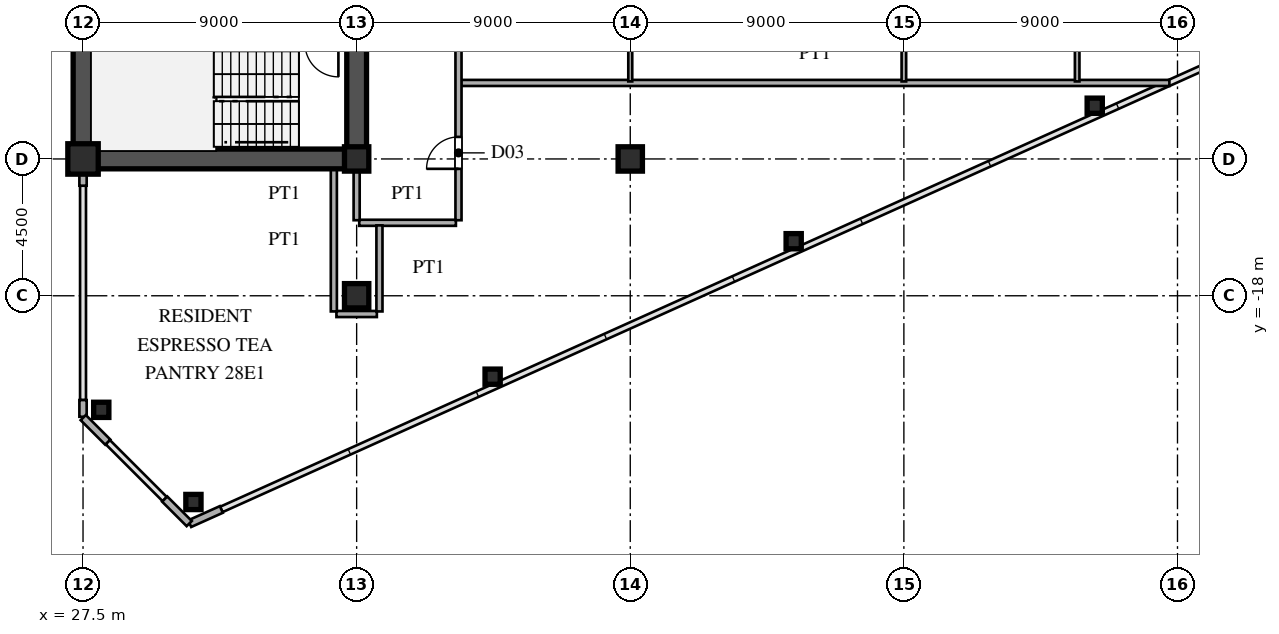
"""IFC4 building model, lengths in metres.
Left out: names, types, materials, properties, quantities, classifications, styles, units other than length and angle.
Written with IfcOpenShell. Run it as: python <this file> out.ifc"""

import sys

from ifc_helpers import new_model, si_unit, direction, frame, frame_2d, origin, origin_2d, place, context, subcontext, project, spatial, rectangle, hollow_rectangle, i_section, extrude, source, transform, mapped, element, fill, save


model = new_model("IFC4")
c1 = context("Model", 3, precision=1e-05, world=origin(), true_north=direction((0.0, 1.0)))
c2 = subcontext(c1, "Body", "Model", "MODEL_VIEW")
j1 = project(units=[si_unit("LENGTHUNIT", "METRE"), si_unit("PLANEANGLEUNIT", "RADIAN")], contexts=[c1])
p1 = place(None, origin())
s1 = spatial("IfcSite", under=j1, at=p1, CompositionType="ELEMENT")
p2 = place(p1, origin())
s2 = spatial("IfcBuilding", under=s1, at=p2, CompositionType="ELEMENT")
p3 = place(p2, frame((0.0, 0.0, 106.8)))
s3 = spatial("IfcBuildingStorey", under=s2, at=p3, CompositionType="ELEMENT", Elevation=106.8)
m1 = source(origin(), c2, "Body", "SweptSolid", [
    extrude(hollow_rectangle(XDim=1.0, YDim=1.0, WallThickness=0.042, at=origin_2d()), origin(), (0.0, 0.0, 1.0), 3.6),
])
p4 = place(p3, frame((27.5, -13.5, 0.0), z_axis=(0.0, 0.0, 1.0), x_axis=(1.0, 0.0, 0.0)))
e1 = element("IfcColumn", 1, at=p4, inside=s3, PredefinedType="COLUMN", context=c2, shape_type="MappedRepresentation", body=[
    mapped(m1, transform((0.0, 0.0, 0.0), scale=1.0)),
])
m2 = source(origin(), c2, "Body", "SweptSolid", [
    extrude(i_section(OverallWidth=0.8, OverallDepth=0.8, WebThickness=0.032, FlangeThickness=0.05, at=origin_2d()), origin(), (0.0, 0.0, 1.0), 3.6),
])
for number, where, z_axis, x_axis in (
    (2, (36.5, -18.0, 0.0), (0.0, 0.0, 1.0), (1.0, 0.0, 0.0)),
    (3, (36.5, -13.5, 0.0), (0.0, 0.0, 1.0), (1.0, 0.0, 0.0)),
    (4, (45.5, -13.5, 0.0), (0.0, 0.0, 1.0), (1.0, 0.0, 0.0)),
):
    element("IfcColumn", number, at=place(p3, frame(where, z_axis=z_axis, x_axis=x_axis)), inside=s3, PredefinedType="COLUMN", context=c2, shape_type="MappedRepresentation", body=[
        mapped(m2, transform((0.0, 0.0, 0.0), scale=1.0)),
    ])
m3 = source(origin(), c2, "Body", "SweptSolid", [
    extrude(hollow_rectangle(XDim=0.5, YDim=0.5, WallThickness=0.02, at=origin_2d()), origin(), (0.0, 0.0, 1.0), 3.6),
])
for number, where, z_axis, x_axis in (
    (5, (31.131, -24.783, 0.0), (0.0, 0.0, 1.0), (1.0, 0.0, 0.0)),
    (6, (28.1, -21.751, 0.0), (0.0, 0.0, 1.0), (1.0, 0.0, 0.0)),
    (7, (40.973, -20.661, 0.0), (0.0, 0.0, 1.0), (1.0, 0.0, 0.0)),
    (8, (50.875, -16.205, 0.0), (0.0, 0.0, 1.0), (1.0, 0.0, 0.0)),
    (9, (60.778, -11.749, 0.0), (0.0, 0.0, 1.0), (1.0, 0.0, 0.0)),
):
    element("IfcColumn", number, at=place(p3, frame(where, z_axis=z_axis, x_axis=x_axis)), inside=s3, PredefinedType="COLUMN", context=c2, shape_type="MappedRepresentation", body=[
        mapped(m3, transform((0.0, 0.0, 0.0), scale=1.0)),
    ])
p5 = place(p3, frame((31.009, -25.496, 0.0), z_axis=(0.0, 0.0, 1.0), x_axis=(0.911929519623, 0.410346866979, 0.0)))
e10 = element("IfcWall", 10, at=p5, inside=s3, PredefinedType="SOLIDWALL", context=c2, shape_type="SweptSolid", body=[
    extrude(rectangle(XDim=1.14, YDim=0.24, at=frame_2d((0.57, 0.0))), origin(), (0.0, 0.0, 1.0), 3.38),
])
p6 = place(p3, frame((27.5, -21.98, 0.0), z_axis=(0.0, 0.0, 1.0), x_axis=(0.0, 1.0, 0.0)))
e11 = element("IfcWall", 11, at=p6, inside=s3, PredefinedType="SOLIDWALL", context=c2, shape_type="SweptSolid", body=[
    extrude(rectangle(XDim=0.55, YDim=0.24, at=frame_2d((0.275, 0.0))), origin(), (0.0, 0.0, 1.0), 3.38),
])
p7 = place(p3, frame((27.5, -14.38, 0.0), z_axis=(0.0, 0.0, 1.0), x_axis=(0.0, 1.0, 0.0)))
e12 = element("IfcWall", 12, at=p7, inside=s3, PredefinedType="SOLIDWALL", context=c2, shape_type="SweptSolid", body=[
    extrude(rectangle(XDim=0.55, YDim=0.24, at=frame_2d((0.275, 0.0))), origin(), (0.0, 0.0, 1.0), 1.88),
])
for number, where, z_axis, x_axis in (
    (13, (27.507, -22.007, 0.0), (0.0, 0.0, 1.0), (0.707, -0.707, 0.0)),
    (14, (30.187, -24.687, 0.0), (0.0, 0.0, 1.0), (0.707, -0.707, 0.0)),
):
    element("IfcWall", number, at=place(p3, frame(where, z_axis=z_axis, x_axis=x_axis)), inside=s3, PredefinedType="SOLIDWALL", context=c2, shape_type="SweptSolid", body=[
        extrude(rectangle(XDim=1.14, YDim=0.24, at=frame_2d((0.57, 0.0))), origin(), (0.0, 0.0, 1.0), 3.38),
    ])
p8 = place(p3, frame((27.5, -13.5, 0.0), z_axis=(0.0, 0.0, 1.0), x_axis=(0.0, 1.0, 0.0)))
e15 = element("IfcWall", 15, at=p8, inside=s3, PredefinedType="SHEAR", context=c2, shape_type="SweptSolid", body=[
    extrude(rectangle(XDim=12.2, YDim=0.65, at=frame_2d((6.1, 0.0))), origin(), (0.0, 0.0, 1.0), 3.38),
])
p9 = place(p3, frame((27.5, -13.5, 0.0), z_axis=(0.0, 0.0, 1.0), x_axis=(1.0, 0.0, 0.0)))
e16 = element("IfcWall", 16, at=p9, inside=s3, PredefinedType="SHEAR", context=c2, shape_type="SweptSolid", body=[
    extrude(rectangle(XDim=9.0, YDim=0.65, at=frame_2d((4.5, 0.0))), origin(), (0.0, 0.0, 1.0), 3.38),
])
p10 = place(p3, frame((36.5, -13.65, 0.0), z_axis=(0.0, 0.0, 1.0), x_axis=(0.0, 1.0, 0.0)))
e17 = element("IfcWall", 17, at=p10, inside=s3, PredefinedType="SHEAR", context=c2, shape_type="SweptSolid", body=[
    extrude(rectangle(XDim=7.15, YDim=0.65, at=frame_2d((3.575, 0.0))), origin(), (0.0, 0.0, 1.0), 3.38),
])
p11 = place(p10, frame((4.675, 0.0, 0.0)))
e18 = element("IfcOpeningElement", 18, at=p11, cuts=e17, PredefinedType="OPENING", context=c2, shape_type="SweptSolid", body=[
    extrude(rectangle(XDim=1.15, YDim=2.2, at=frame_2d((0.575, 1.1))), frame((0.0, 0.335, 0.0), z_axis=(0.0, -1.0, 0.0), x_axis=(1.0, 0.0, 0.0)), (0.0, 0.0, 1.0), 0.67),
])
p12 = place(p3, frame((35.835, -18.6, 0.0), z_axis=(0.0, 0.0, 1.0), x_axis=(1.0, 0.0, 0.0)))
e19 = element("IfcWall", 19, at=p12, inside=s3, PredefinedType="PARTITIONING", context=c2, shape_type="SweptSolid", body=[
    extrude(rectangle(XDim=1.33, YDim=0.2, at=frame_2d((0.665, 0.0))), origin(), (0.0, 0.0, 1.0), 3.38),
])
p13 = place(p3, frame((36.585, -15.6, 0.0), z_axis=(0.0, 0.0, 1.0), x_axis=(1.0, 0.0, 0.0)))
e20 = element("IfcWall", 20, at=p13, inside=s3, PredefinedType="PARTITIONING", context=c2, shape_type="SweptSolid", body=[
    extrude(rectangle(XDim=3.18, YDim=0.2, at=frame_2d((1.59, 0.0))), origin(), (0.0, 0.0, 1.0), 3.38),
])
p14 = place(p3, frame((39.93, -11.0, 0.0), z_axis=(0.0, 0.0, 1.0), x_axis=(1.0, 0.0, 0.0)))
e21 = element("IfcWall", 21, at=p14, inside=s3, PredefinedType="PARTITIONING", context=c2, shape_type="SweptSolid", body=[
    extrude(rectangle(XDim=23.304, YDim=0.2, at=frame_2d((11.652, 0.0))), origin(), (0.0, 0.0, 1.0), 3.38),
])
p15 = place(p3, frame((35.75, -18.515, 0.0), z_axis=(0.0, 0.0, 1.0), x_axis=(0.0, 1.0, 0.0)))
e22 = element("IfcWall", 22, at=p15, inside=s3, PredefinedType="PARTITIONING", context=c2, shape_type="SweptSolid", body=[
    extrude(rectangle(XDim=4.685, YDim=0.2, at=frame_2d((2.342, 0.0))), origin(), (0.0, 0.0, 1.0), 3.38),
])
p16 = place(p3, frame((36.5, -15.515, 0.0), z_axis=(0.0, 0.0, 1.0), x_axis=(0.0, 1.0, 0.0)))
e23 = element("IfcWall", 23, at=p16, inside=s3, PredefinedType="PARTITIONING", context=c2, shape_type="SweptSolid", body=[
    extrude(rectangle(XDim=1.685, YDim=0.2, at=frame_2d((0.842, 0.0))), origin(), (0.0, 0.0, 1.0), 1.38),
])
p17 = place(p3, frame((37.25, -18.515, 0.0), z_axis=(0.0, 0.0, 1.0), x_axis=(0.0, 1.0, 0.0)))
e24 = element("IfcWall", 24, at=p17, inside=s3, PredefinedType="PARTITIONING", context=c2, shape_type="SweptSolid", body=[
    extrude(rectangle(XDim=2.83, YDim=0.2, at=frame_2d((1.415, 0.0))), origin(), (0.0, 0.0, 1.0), 3.38),
])
p18 = place(p3, frame((39.85, -15.515, 0.0), z_axis=(0.0, 0.0, 1.0), x_axis=(0.0, 1.0, 0.0)))
e25 = element("IfcWall", 25, at=p18, inside=s3, PredefinedType="PARTITIONING", context=c2, shape_type="SweptSolid", body=[
    extrude(rectangle(XDim=31.03, YDim=0.2, at=frame_2d((15.515, 0.0))), origin(), (0.0, 0.0, 1.0), 3.38),
])
p19 = place(p18, frame((1.69, 0.0, 0.0)))
e26 = element("IfcOpeningElement", 26, at=p19, cuts=e25, PredefinedType="OPENING", context=c2, shape_type="SweptSolid", body=[
    extrude(rectangle(XDim=1.05, YDim=2.25, at=frame_2d((0.525, 1.125))), frame((0.0, 0.11, 0.0), z_axis=(0.0, -1.0, 0.0), x_axis=(1.0, 0.0, 0.0)), (0.0, 0.0, 1.0), 0.22),
])
p20 = place(p18, frame((10.538, 0.0, 0.0)))
e27 = element("IfcOpeningElement", 27, at=p20, cuts=e25, PredefinedType="OPENING", context=c2, shape_type="SweptSolid", body=[
    extrude(rectangle(XDim=1.05, YDim=2.25, at=frame_2d((0.525, 1.125))), frame((0.0, 0.11, 0.0), z_axis=(0.0, -1.0, 0.0), x_axis=(1.0, 0.0, 0.0)), (0.0, 0.0, 1.0), 0.22),
])
p21 = place(p18, frame((24.067, 0.0, 0.0)))
e28 = element("IfcOpeningElement", 28, at=p21, cuts=e25, PredefinedType="OPENING", context=c2, shape_type="SweptSolid", body=[
    extrude(rectangle(XDim=1.05, YDim=2.25, at=frame_2d((0.525, 1.125))), frame((0.0, 0.11, 0.0), z_axis=(0.0, -1.0, 0.0), x_axis=(1.0, 0.0, 0.0)), (0.0, 0.0, 1.0), 0.22),
])
p22 = place(p3, frame((45.5, -10.95, 0.0), z_axis=(0.0, 0.0, 1.0), x_axis=(0.0, 1.0, 0.0)))
e29 = element("IfcWall", 29, at=p22, inside=s3, PredefinedType="PARTITIONING", context=c2, shape_type="SweptSolid", body=[
    extrude(rectangle(XDim=8.9, YDim=0.13, at=frame_2d((4.45, 0.0))), origin(), (0.0, 0.0, 1.0), 2.78),
])
p23 = place(p22, frame((6.923, 0.0, 0.0)))
e30 = element("IfcOpeningElement", 30, at=p23, cuts=e29, PredefinedType="OPENING", context=c2, shape_type="SweptSolid", body=[
    extrude(rectangle(XDim=0.95, YDim=2.15, at=frame_2d((0.475, 1.075))), frame((0.0, 0.075, 0.0), z_axis=(0.0, -1.0, 0.0), x_axis=(1.0, 0.0, 0.0)), (0.0, 0.0, 1.0), 0.15),
])
p24 = place(p3, frame((54.5, -10.95, 0.0), z_axis=(0.0, 0.0, 1.0), x_axis=(0.0, 1.0, 0.0)))
e31 = element("IfcWall", 31, at=p24, inside=s3, PredefinedType="PARTITIONING", context=c2, shape_type="SweptSolid", body=[
    extrude(rectangle(XDim=24.383, YDim=0.15, at=frame_2d((12.191, 0.0))), origin(), (0.0, 0.0, 1.0), 2.78),
])
p25 = place(p24, frame((6.957, 0.0, 0.0)))
e32 = element("IfcOpeningElement", 32, at=p25, cuts=e31, PredefinedType="OPENING", context=c2, shape_type="SweptSolid", body=[
    extrude(rectangle(XDim=0.95, YDim=2.15, at=frame_2d((0.475, 1.075))), frame((0.0, 0.085, 0.0), z_axis=(0.0, -1.0, 0.0), x_axis=(1.0, 0.0, 0.0)), (0.0, 0.0, 1.0), 0.17),
])
p26 = place(p24, frame((21.212, 0.0, 0.0)))
e33 = element("IfcOpeningElement", 33, at=p26, cuts=e31, PredefinedType="OPENING", context=c2, shape_type="SweptSolid", body=[
    extrude(rectangle(XDim=0.95, YDim=2.15, at=frame_2d((0.475, 1.075))), frame((0.0, 0.085, 0.0), z_axis=(0.0, -1.0, 0.0), x_axis=(1.0, 0.0, 0.0)), (0.0, 0.0, 1.0), 0.17),
])
p27 = place(p24, frame((16.018, 0.0, 0.0)))
e34 = element("IfcOpeningElement", 34, at=p27, cuts=e31, PredefinedType="OPENING", context=c2, shape_type="SweptSolid", body=[
    extrude(rectangle(XDim=0.95, YDim=2.15, at=frame_2d((0.475, 1.075))), frame((0.0, 0.085, 0.0), z_axis=(0.0, -1.0, 0.0), x_axis=(1.0, 0.0, 0.0)), (0.0, 0.0, 1.0), 0.17),
])
p28 = place(p3, frame((60.2, -10.95, 0.0), z_axis=(0.0, 0.0, 1.0), x_axis=(0.0, 1.0, 0.0)))
e35 = element("IfcWall", 35, at=p28, inside=s3, PredefinedType="PARTITIONING", context=c2, shape_type="SweptSolid", body=[
    extrude(rectangle(XDim=18.892, YDim=0.15, at=frame_2d((9.446, 0.0))), origin(), (0.0, 0.0, 1.0), 3.38),
])
p29 = place(p28, frame((1.725, 0.0, 0.0)))
e36 = element("IfcOpeningElement", 36, at=p29, cuts=e35, PredefinedType="OPENING", context=c2, shape_type="SweptSolid", body=[
    extrude(rectangle(XDim=0.95, YDim=2.15, at=frame_2d((0.475, 1.075))), frame((0.0, 0.085, 0.0), z_axis=(0.0, -1.0, 0.0), x_axis=(1.0, 0.0, 0.0)), (0.0, 0.0, 1.0), 0.17),
])
p30 = place(p28, frame((6.225, 0.0, 0.0)))
e37 = element("IfcOpeningElement", 37, at=p30, cuts=e35, PredefinedType="OPENING", context=c2, shape_type="SweptSolid", body=[
    extrude(rectangle(XDim=0.95, YDim=2.15, at=frame_2d((0.475, 1.075))), frame((0.0, 0.085, 0.0), z_axis=(0.0, -1.0, 0.0), x_axis=(1.0, 0.0, 0.0)), (0.0, 0.0, 1.0), 0.17),
])
p31 = place(p28, frame((10.725, 0.0, 0.0)))
e38 = element("IfcOpeningElement", 38, at=p31, cuts=e35, PredefinedType="OPENING", context=c2, shape_type="SweptSolid", body=[
    extrude(rectangle(XDim=0.95, YDim=2.15, at=frame_2d((0.475, 1.075))), frame((0.0, 0.085, 0.0), z_axis=(0.0, -1.0, 0.0), x_axis=(1.0, 0.0, 0.0)), (0.0, 0.0, 1.0), 0.17),
])
p32 = place(p28, frame((15.721, 0.0, 0.0)))
e39 = element("IfcOpeningElement", 39, at=p32, cuts=e35, PredefinedType="OPENING", context=c2, shape_type="SweptSolid", body=[
    extrude(rectangle(XDim=0.95, YDim=2.15, at=frame_2d((0.475, 1.075))), frame((0.0, 0.085, 0.0), z_axis=(0.0, -1.0, 0.0), x_axis=(1.0, 0.0, 0.0)), (0.0, 0.0, 1.0), 0.17),
])
m4 = source(origin(), c2, "Body", "SweptSolid", [
    extrude(rectangle(XDim=1.05, YDim=2.25, at=frame_2d((0.525, 1.125))), frame((0.0, 0.025, 0.0), z_axis=(0.0, -1.0, 0.0), x_axis=(1.0, 0.0, 0.0)), (0.0, 0.0, 1.0), 0.05),
])
p33 = place(p19, origin())
e40 = element("IfcDoor", 40, at=p33, inside=s3, OperationType="SINGLE_SWING_LEFT", PredefinedType="DOOR", context=c2, shape_type="MappedRepresentation", body=[
    mapped(m4, transform((0.0, 0.0, 0.0), scale=1.0)),
])
fill(e26, e40)
save(model, sys.argv[1])
